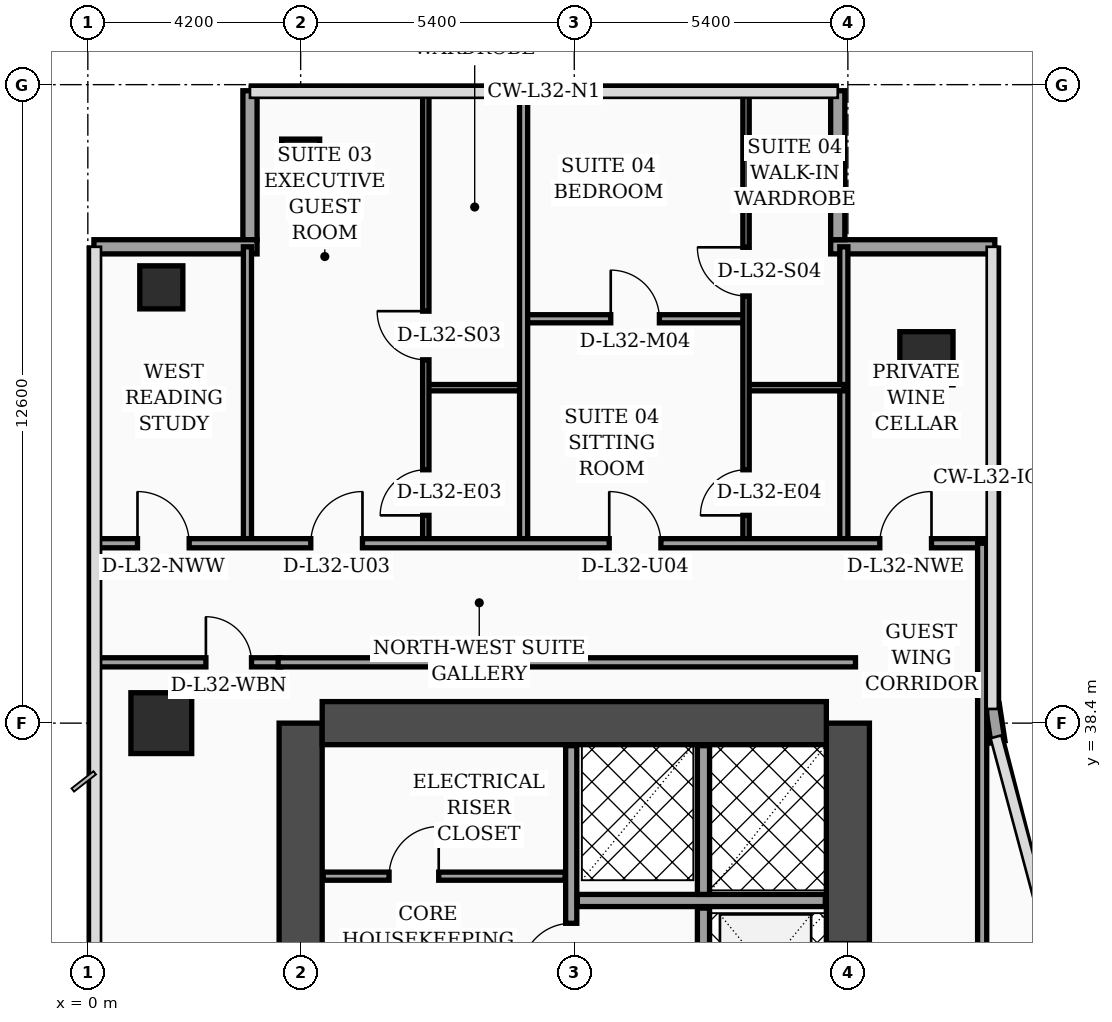
"""IFC4 building model, lengths in metres.
Left out: names, types, materials, properties, quantities, classifications, styles, units other than length and angle.
Written with IfcOpenShell. Run it as: python <this file> out.ifc"""

import sys

from ifc_helpers import new_model, si_unit, direction, frame, frame_2d, origin, origin_2d, place, context, subcontext, project, spatial, rectangle, hollow_rectangle, extrude, element, fill, save


model = new_model("IFC4")
c1 = context("Model", 3, precision=1e-05, world=origin(), true_north=direction((0.0, 1.0)))
c2 = subcontext(c1, "Body", "Model", "MODEL_VIEW")
j1 = project(units=[si_unit("LENGTHUNIT", "METRE"), si_unit("PLANEANGLEUNIT", "RADIAN")], contexts=[c1])
p1 = place(None, origin())
s1 = spatial("IfcSite", under=j1, at=p1, CompositionType="ELEMENT")
p2 = place(p1, origin())
s2 = spatial("IfcBuilding", under=s1, at=p2, CompositionType="ELEMENT")
p3 = place(p2, frame((0.0, 0.0, 131.6)))
s3 = spatial("IfcBuildingStorey", under=s2, at=p3, CompositionType="ELEMENT", Elevation=131.6)
p4 = place(p3, frame((4.2, 16.8, 0.0), z_axis=(0.0, 0.0, 1.0), x_axis=(0.0, 1.0, 0.0)))
e1 = element("IfcWall", 1, at=p4, inside=s3, PredefinedType="SHEAR", context=c2, shape_type="SweptSolid", body=[
    extrude(rectangle(XDim=21.6, YDim=0.85, at=frame_2d((10.8, 0.0))), origin(), (0.0, 0.0, 1.0), 3.56),
])
p5 = place(p3, frame((15.0, 16.8, 0.0), z_axis=(0.0, 0.0, 1.0), x_axis=(0.0, 1.0, 0.0)))
e2 = element("IfcWall", 2, at=p5, inside=s3, PredefinedType="SHEAR", context=c2, shape_type="SweptSolid", body=[
    extrude(rectangle(XDim=21.6, YDim=0.85, at=frame_2d((10.8, 0.0))), origin(), (0.0, 0.0, 1.0), 3.56),
])
p6 = place(p5, frame((8.65, 0.0, 0.0)))
e3 = element("IfcOpeningElement", 3, at=p6, cuts=e2, PredefinedType="OPENING", context=c2, shape_type="SweptSolid", body=[
    extrude(rectangle(XDim=1.1, YDim=2.2, at=frame_2d((0.55, 1.1))), frame((0.0, 0.435, 0.0), z_axis=(0.0, -1.0, 0.0), x_axis=(1.0, 0.0, 0.0)), (0.0, 0.0, 1.0), 0.87),
])
p7 = place(p5, frame((10.85, 0.0, 0.0)))
e4 = element("IfcOpeningElement", 4, at=p7, cuts=e2, PredefinedType="OPENING", context=c2, shape_type="SweptSolid", body=[
    extrude(rectangle(XDim=1.1, YDim=2.2, at=frame_2d((0.55, 1.1))), frame((0.0, 0.435, 0.0), z_axis=(0.0, -1.0, 0.0), x_axis=(1.0, 0.0, 0.0)), (0.0, 0.0, 1.0), 0.87),
])
p8 = place(p5, frame((13.5, 0.0, 0.0)))
e5 = element("IfcOpeningElement", 5, at=p8, cuts=e2, PredefinedType="OPENING", context=c2, shape_type="SweptSolid", body=[
    extrude(rectangle(XDim=1.1, YDim=2.2, at=frame_2d((0.55, 1.1))), frame((0.0, 0.435, 0.0), z_axis=(0.0, -1.0, 0.0), x_axis=(1.0, 0.0, 0.0)), (0.0, 0.0, 1.0), 0.87),
])
p9 = place(p5, frame((16.15, 0.0, 0.0)))
e6 = element("IfcOpeningElement", 6, at=p9, cuts=e2, PredefinedType="OPENING", context=c2, shape_type="SweptSolid", body=[
    extrude(rectangle(XDim=1.1, YDim=2.2, at=frame_2d((0.55, 1.1))), frame((0.0, 0.435, 0.0), z_axis=(0.0, -1.0, 0.0), x_axis=(1.0, 0.0, 0.0)), (0.0, 0.0, 1.0), 0.87),
])
p10 = place(p3, frame((4.625, 38.4, 0.0), z_axis=(0.0, 0.0, 1.0), x_axis=(1.0, 0.0, 0.0)))
e7 = element("IfcWall", 7, at=p10, inside=s3, PredefinedType="SHEAR", context=c2, shape_type="SweptSolid", body=[
    extrude(rectangle(XDim=9.95, YDim=0.85, at=frame_2d((4.975, 0.0))), origin(), (0.0, 0.0, 1.0), 3.56),
])
p11 = place(p3, frame((1.45, 38.4, 0.0), z_axis=(0.0, 0.0, 1.0), x_axis=(1.0, 0.0, 0.0)))
e8 = element("IfcColumn", 8, at=p11, inside=s3, PredefinedType="COLUMN", context=c2, shape_type="SweptSolid", body=[
    extrude(rectangle(XDim=1.2, YDim=1.2, at=origin_2d()), origin(), (0.0, 0.0, 1.0), 3.56),
])
p12 = place(p3, frame((1.45, 47.0, 0.0), z_axis=(0.0, 0.0, 1.0), x_axis=(1.0, 0.0, 0.0)))
e9 = element("IfcColumn", 9, at=p12, inside=s3, PredefinedType="COLUMN", context=c2, shape_type="SweptSolid", body=[
    extrude(hollow_rectangle(XDim=0.85, YDim=0.85, WallThickness=0.036, at=origin_2d()), origin(), (0.0, 0.0, 1.0), 3.56),
])
p13 = place(p3, frame((4.2, 49.55, 0.0), z_axis=(0.0, 0.0, 1.0), x_axis=(1.0, 0.0, 0.0)))
e10 = element("IfcColumn", 10, at=p13, inside=s3, PredefinedType="COLUMN", context=c2, shape_type="SweptSolid", body=[
    extrude(hollow_rectangle(XDim=0.75, YDim=0.75, WallThickness=0.032, at=origin_2d()), origin(), (0.0, 0.0, 1.0), 3.56),
])
p14 = place(p3, frame((16.55, 45.6, 0.0), z_axis=(0.0, 0.0, 1.0), x_axis=(1.0, 0.0, 0.0)))
e11 = element("IfcColumn", 11, at=p14, inside=s3, PredefinedType="COLUMN", context=c2, shape_type="SweptSolid", body=[
    extrude(rectangle(XDim=1.05, YDim=1.05, at=origin_2d()), origin(), (0.0, 0.0, 1.0), 3.56),
])
p15 = place(p3, frame((17.962, 38.03, 0.0), z_axis=(0.0, 0.0, 1.0), x_axis=(-0.15141125477, 0.988470855377, 0.0)))
e12 = element("IfcWall", 12, at=p15, inside=s3, PredefinedType="SOLIDWALL", context=c2, shape_type="SweptSolid", body=[
    extrude(rectangle(XDim=0.739, YDim=0.28, at=frame_2d((0.369, 0.0))), origin(), (0.0, 0.0, 1.0), 3.56),
])
p16 = place(p3, frame((17.9, 47.8, 0.0), z_axis=(0.0, 0.0, 1.0), x_axis=(-1.0, 0.0, 0.0)))
e13 = element("IfcWall", 13, at=p16, inside=s3, PredefinedType="SOLIDWALL", context=c2, shape_type="SweptSolid", body=[
    extrude(rectangle(XDim=3.24, YDim=0.28, at=frame_2d((1.62, 0.0))), origin(), (0.0, 0.0, 1.0), 3.56),
])
p17 = place(p3, frame((14.8, 47.94, 0.0), z_axis=(0.0, 0.0, 1.0), x_axis=(0.0, 1.0, 0.0)))
e14 = element("IfcWall", 14, at=p17, inside=s3, PredefinedType="SOLIDWALL", context=c2, shape_type="SweptSolid", body=[
    extrude(rectangle(XDim=2.94, YDim=0.28, at=frame_2d((1.47, 0.0))), origin(), (0.0, 0.0, 1.0), 3.56),
])
p18 = place(p3, frame((3.2, 50.88, 0.0), z_axis=(0.0, 0.0, 1.0), x_axis=(0.0, -1.0, 0.0)))
e15 = element("IfcWall", 15, at=p18, inside=s3, PredefinedType="SOLIDWALL", context=c2, shape_type="SweptSolid", body=[
    extrude(rectangle(XDim=2.94, YDim=0.28, at=frame_2d((1.47, 0.0))), origin(), (0.0, 0.0, 1.0), 3.04),
])
p19 = place(p3, frame((3.34, 47.8, 0.0), z_axis=(0.0, 0.0, 1.0), x_axis=(-1.0, 0.0, 0.0)))
e16 = element("IfcWall", 16, at=p19, inside=s3, PredefinedType="SOLIDWALL", context=c2, shape_type="SweptSolid", body=[
    extrude(rectangle(XDim=3.22, YDim=0.28, at=frame_2d((1.61, 0.0))), origin(), (0.0, 0.0, 1.0), 3.04),
])
p20 = place(p3, frame((4.645, 35.38, 0.0), z_axis=(0.0, 0.0, 1.0), x_axis=(1.0, 0.0, 0.0)))
e17 = element("IfcWall", 17, at=p20, inside=s3, PredefinedType="PARTITIONING", context=c2, shape_type="SweptSolid", body=[
    extrude(rectangle(XDim=4.775, YDim=0.16, at=frame_2d((2.387, 0.0))), origin(), (0.0, 0.0, 1.0), 3.56),
])
p21 = place(p20, frame((1.3, 0.0, 0.0)))
e18 = element("IfcOpeningElement", 18, at=p21, cuts=e17, PredefinedType="OPENING", context=c2, shape_type="SweptSolid", body=[
    extrude(rectangle(XDim=0.98, YDim=2.15, at=frame_2d((0.49, 1.075))), frame((0.0, 0.09, 0.0), z_axis=(0.0, -1.0, 0.0), x_axis=(1.0, 0.0, 0.0)), (0.0, 0.0, 1.0), 0.18),
])
p22 = place(p3, frame((9.54, 32.92, 0.0), z_axis=(0.0, 0.0, 1.0), x_axis=(0.0, 1.0, 0.0)))
e19 = element("IfcWall", 19, at=p22, inside=s3, PredefinedType="SOLIDWALL", context=c2, shape_type="SweptSolid", body=[
    extrude(rectangle(XDim=5.035, YDim=0.22, at=frame_2d((2.518, 0.0))), origin(), (0.0, 0.0, 1.0), 3.56),
])
p23 = place(p22, frame((0.55, 0.0, 0.0)))
e20 = element("IfcOpeningElement", 20, at=p23, cuts=e19, PredefinedType="OPENING", context=c2, shape_type="SweptSolid", body=[
    extrude(rectangle(XDim=0.98, YDim=2.15, at=frame_2d((0.49, 1.075))), frame((0.0, 0.12, 0.0), z_axis=(0.0, -1.0, 0.0), x_axis=(1.0, 0.0, 0.0)), (0.0, 0.0, 1.0), 0.24),
])
p24 = place(p3, frame((12.15, 27.0, 0.0), z_axis=(0.0, 0.0, 1.0), x_axis=(0.0, 1.0, 0.0)))
e21 = element("IfcWall", 21, at=p24, inside=s3, PredefinedType="SOLIDWALL", context=c2, shape_type="SweptSolid", body=[
    extrude(rectangle(XDim=7.75, YDim=0.24, at=frame_2d((3.875, 0.0))), origin(), (0.0, 0.0, 1.0), 3.56),
])
p25 = place(p3, frame((9.66, 34.9, 0.0), z_axis=(0.0, 0.0, 1.0), x_axis=(1.0, 0.0, 0.0)))
e22 = element("IfcWall", 22, at=p25, inside=s3, PredefinedType="SOLIDWALL", context=c2, shape_type="SweptSolid", body=[
    extrude(rectangle(XDim=4.895, YDim=0.24, at=frame_2d((2.448, 0.0))), origin(), (0.0, 0.0, 1.0), 3.56),
])
p26 = place(p3, frame((12.15, 35.02, 0.0), z_axis=(0.0, 0.0, 1.0), x_axis=(0.0, 1.0, 0.0)))
e23 = element("IfcWall", 23, at=p26, inside=s3, PredefinedType="SOLIDWALL", context=c2, shape_type="SweptSolid", body=[
    extrude(rectangle(XDim=2.935, YDim=0.24, at=frame_2d((1.468, 0.0))), origin(), (0.0, 0.0, 1.0), 3.56),
])
p27 = place(p3, frame((0.08, 39.6, 0.0), z_axis=(0.0, 0.0, 1.0), x_axis=(1.0, 0.0, 0.0)))
e24 = element("IfcWall", 24, at=p27, inside=s3, PredefinedType="PARTITIONING", context=c2, shape_type="SweptSolid", body=[
    extrude(rectangle(XDim=3.725, YDim=0.18, at=frame_2d((1.862, 0.0))), origin(), (0.0, 0.0, 1.0), 2.84),
])
p28 = place(p27, frame((2.25, 0.0, 0.0)))
e25 = element("IfcOpeningElement", 25, at=p28, cuts=e24, PredefinedType="OPENING", context=c2, shape_type="SweptSolid", body=[
    extrude(rectangle(XDim=0.9, YDim=2.15, at=frame_2d((0.45, 1.075))), frame((0.0, 0.1, 0.0), z_axis=(0.0, -1.0, 0.0), x_axis=(1.0, 0.0, 0.0)), (0.0, 0.0, 1.0), 0.2),
])
p29 = place(p3, frame((3.15, 41.95, 0.0), z_axis=(0.0, 0.0, 1.0), x_axis=(0.0, 1.0, 0.0)))
e26 = element("IfcWall", 26, at=p29, inside=s3, PredefinedType="PARTITIONING", context=c2, shape_type="SweptSolid", body=[
    extrude(rectangle(XDim=5.85, YDim=0.16, at=frame_2d((2.925, 0.0))), origin(), (0.0, 0.0, 1.0), 3.14),
])
p30 = place(p3, frame((14.92, 41.95, 0.0), z_axis=(0.0, 0.0, 1.0), x_axis=(0.0, 1.0, 0.0)))
e27 = element("IfcWall", 27, at=p30, inside=s3, PredefinedType="PARTITIONING", context=c2, shape_type="SweptSolid", body=[
    extrude(rectangle(XDim=5.85, YDim=0.16, at=frame_2d((2.925, 0.0))), origin(), (0.0, 0.0, 1.0), 3.04),
])
p31 = place(p3, frame((6.67, 45.02, 0.0), z_axis=(0.0, 0.0, 1.0), x_axis=(1.0, 0.0, 0.0)))
e28 = element("IfcWall", 28, at=p31, inside=s3, PredefinedType="PARTITIONING", context=c2, shape_type="SweptSolid", body=[
    extrude(rectangle(XDim=1.93, YDim=0.125, at=frame_2d((0.965, 0.0))), origin(), (0.0, 0.0, 1.0), 3.56),
])
p32 = place(p3, frame((6.67, 41.95, 0.0), z_axis=(0.0, 0.0, 1.0), x_axis=(0.0, 1.0, 0.0)))
e29 = element("IfcWall", 29, at=p32, inside=s3, PredefinedType="PARTITIONING", context=c2, shape_type="SweptSolid", body=[
    extrude(rectangle(XDim=8.99, YDim=0.125, at=frame_2d((4.495, 0.0))), origin(), (0.0, 0.0, 1.0), 3.04),
])
p33 = place(p32, frame((0.55, 0.0, 0.0)))
e30 = element("IfcOpeningElement", 30, at=p33, cuts=e29, PredefinedType="OPENING", context=c2, shape_type="SweptSolid", body=[
    extrude(rectangle(XDim=0.9, YDim=2.15, at=frame_2d((0.45, 1.075))), frame((0.0, 0.073, 0.0), z_axis=(0.0, -1.0, 0.0), x_axis=(1.0, 0.0, 0.0)), (0.0, 0.0, 1.0), 0.145),
])
p34 = place(p32, frame((3.62, 0.0, 0.0)))
e31 = element("IfcOpeningElement", 31, at=p34, cuts=e29, PredefinedType="OPENING", context=c2, shape_type="SweptSolid", body=[
    extrude(rectangle(XDim=0.96, YDim=2.2, at=frame_2d((0.48, 1.1))), frame((0.0, 0.073, 0.0), z_axis=(0.0, -1.0, 0.0), x_axis=(1.0, 0.0, 0.0)), (0.0, 0.0, 1.0), 0.145),
])
p35 = place(p3, frame((12.99, 45.02, 0.0), z_axis=(0.0, 0.0, 1.0), x_axis=(1.0, 0.0, 0.0)))
e32 = element("IfcWall", 32, at=p35, inside=s3, PredefinedType="PARTITIONING", context=c2, shape_type="SweptSolid", body=[
    extrude(rectangle(XDim=1.93, YDim=0.125, at=frame_2d((0.965, 0.0))), origin(), (0.0, 0.0, 1.0), 3.56),
])
p36 = place(p3, frame((8.6, 46.38, 0.0), z_axis=(0.0, 0.0, 1.0), x_axis=(1.0, 0.0, 0.0)))
e33 = element("IfcWall", 33, at=p36, inside=s3, PredefinedType="PARTITIONING", context=c2, shape_type="SweptSolid", body=[
    extrude(rectangle(XDim=4.39, YDim=0.16, at=frame_2d((2.195, 0.0))), origin(), (0.0, 0.0, 1.0), 3.04),
])
p37 = place(p36, frame((1.72, 0.0, 0.0)))
e34 = element("IfcOpeningElement", 34, at=p37, cuts=e33, PredefinedType="OPENING", context=c2, shape_type="SweptSolid", body=[
    extrude(rectangle(XDim=0.96, YDim=2.2, at=frame_2d((0.48, 1.1))), frame((0.0, 0.09, 0.0), z_axis=(0.0, -1.0, 0.0), x_axis=(1.0, 0.0, 0.0)), (0.0, 0.0, 1.0), 0.18),
])
p38 = place(p3, frame((12.99, 41.95, 0.0), z_axis=(0.0, 0.0, 1.0), x_axis=(0.0, 1.0, 0.0)))
e35 = element("IfcWall", 35, at=p38, inside=s3, PredefinedType="PARTITIONING", context=c2, shape_type="SweptSolid", body=[
    extrude(rectangle(XDim=8.99, YDim=0.125, at=frame_2d((4.495, 0.0))), origin(), (0.0, 0.0, 1.0), 3.04),
])
p39 = place(p38, frame((0.55, 0.0, 0.0)))
e36 = element("IfcOpeningElement", 36, at=p39, cuts=e35, PredefinedType="OPENING", context=c2, shape_type="SweptSolid", body=[
    extrude(rectangle(XDim=0.9, YDim=2.15, at=frame_2d((0.45, 1.075))), frame((0.0, 0.073, 0.0), z_axis=(0.0, -1.0, 0.0), x_axis=(1.0, 0.0, 0.0)), (0.0, 0.0, 1.0), 0.145),
])
p40 = place(p38, frame((4.88, 0.0, 0.0)))
e37 = element("IfcOpeningElement", 37, at=p40, cuts=e35, PredefinedType="OPENING", context=c2, shape_type="SweptSolid", body=[
    extrude(rectangle(XDim=0.96, YDim=2.2, at=frame_2d((0.48, 1.1))), frame((0.0, 0.073, 0.0), z_axis=(0.0, -1.0, 0.0), x_axis=(1.0, 0.0, 0.0)), (0.0, 0.0, 1.0), 0.145),
])
p41 = place(p3, frame((8.6, 41.95, 0.0), z_axis=(0.0, 0.0, 1.0), x_axis=(0.0, 1.0, 0.0)))
e38 = element("IfcWall", 38, at=p41, inside=s3, PredefinedType="PARTITIONING", context=c2, shape_type="SweptSolid", body=[
    extrude(rectangle(XDim=8.99, YDim=0.16, at=frame_2d((4.495, 0.0))), origin(), (0.0, 0.0, 1.0), 3.04),
])
p42 = place(p3, frame((0.08, 41.95, 0.0), z_axis=(0.0, 0.0, 1.0), x_axis=(1.0, 0.0, 0.0)))
e39 = element("IfcWall", 39, at=p42, inside=s3, PredefinedType="PARTITIONING", context=c2, shape_type="SweptSolid", body=[
    extrude(rectangle(XDim=17.77, YDim=0.18, at=frame_2d((8.885, 0.0))), origin(), (0.0, 0.0, 1.0), 2.84),
])
p43 = place(p42, frame((0.9, 0.0, 0.0)))
e40 = element("IfcOpeningElement", 40, at=p43, cuts=e39, PredefinedType="OPENING", context=c2, shape_type="SweptSolid", body=[
    extrude(rectangle(XDim=1.02, YDim=2.2, at=frame_2d((0.51, 1.1))), frame((0.0, 0.1, 0.0), z_axis=(0.0, -1.0, 0.0), x_axis=(1.0, 0.0, 0.0)), (0.0, 0.0, 1.0), 0.2),
])
p44 = place(p42, frame((4.32, 0.0, 0.0)))
e41 = element("IfcOpeningElement", 41, at=p44, cuts=e39, PredefinedType="OPENING", context=c2, shape_type="SweptSolid", body=[
    extrude(rectangle(XDim=1.02, YDim=2.2, at=frame_2d((0.51, 1.1))), frame((0.0, 0.1, 0.0), z_axis=(0.0, -1.0, 0.0), x_axis=(1.0, 0.0, 0.0)), (0.0, 0.0, 1.0), 0.2),
])
p45 = place(p42, frame((10.21, 0.0, 0.0)))
e42 = element("IfcOpeningElement", 42, at=p45, cuts=e39, PredefinedType="OPENING", context=c2, shape_type="SweptSolid", body=[
    extrude(rectangle(XDim=1.02, YDim=2.2, at=frame_2d((0.51, 1.1))), frame((0.0, 0.1, 0.0), z_axis=(0.0, -1.0, 0.0), x_axis=(1.0, 0.0, 0.0)), (0.0, 0.0, 1.0), 0.2),
])
p46 = place(p42, frame((15.55, 0.0, 0.0)))
e43 = element("IfcOpeningElement", 43, at=p46, cuts=e39, PredefinedType="OPENING", context=c2, shape_type="SweptSolid", body=[
    extrude(rectangle(XDim=1.02, YDim=2.2, at=frame_2d((0.51, 1.1))), frame((0.0, 0.1, 0.0), z_axis=(0.0, -1.0, 0.0), x_axis=(1.0, 0.0, 0.0)), (0.0, 0.0, 1.0), 0.2),
])
p47 = place(p3, frame((17.65, 24.3, 0.0), z_axis=(0.0, 0.0, 1.0), x_axis=(0.0, 1.0, 0.0)))
e44 = element("IfcWall", 44, at=p47, inside=s3, PredefinedType="PARTITIONING", context=c2, shape_type="SweptSolid", body=[
    extrude(rectangle(XDim=17.65, YDim=0.18, at=frame_2d((8.825, 0.0))), origin(), (0.0, 0.0, 1.0), 2.84),
])
p48 = place(p3, frame((3.755, 39.6, 0.0), z_axis=(0.0, 0.0, 1.0), x_axis=(1.0, 0.0, 0.0)))
e45 = element("IfcWall", 45, at=p48, inside=s3, PredefinedType="PARTITIONING", context=c2, shape_type="SweptSolid", body=[
    extrude(rectangle(XDim=11.395, YDim=0.18, at=frame_2d((5.698, 0.0))), origin(), (0.0, 0.0, 1.0), 2.84),
])
p49 = place(p21, origin())
e46 = element("IfcDoor", 46, at=p49, inside=s3, OperationType="SINGLE_SWING_RIGHT", PredefinedType="DOOR", context=c2, shape_type="SweptSolid", body=[
    extrude(rectangle(XDim=0.98, YDim=2.15, at=frame_2d((0.49, 1.075))), frame((0.0, 0.025, 0.0), z_axis=(0.0, -1.0, 0.0), x_axis=(1.0, 0.0, 0.0)), (0.0, 0.0, 1.0), 0.05),
])
fill(e18, e46)
p50 = place(p23, origin())
e47 = element("IfcDoor", 47, at=p50, inside=s3, OperationType="SINGLE_SWING_LEFT", PredefinedType="DOOR", context=c2, shape_type="SweptSolid", body=[
    extrude(rectangle(XDim=0.98, YDim=2.15, at=frame_2d((0.49, 1.075))), frame((0.0, 0.025, 0.0), z_axis=(0.0, -1.0, 0.0), x_axis=(1.0, 0.0, 0.0)), (0.0, 0.0, 1.0), 0.05),
])
fill(e20, e47)
p51 = place(p28, origin())
e48 = element("IfcDoor", 48, at=p51, inside=s3, OperationType="SINGLE_SWING_LEFT", PredefinedType="DOOR", context=c2, shape_type="SweptSolid", body=[
    extrude(rectangle(XDim=0.9, YDim=2.15, at=frame_2d((0.45, 1.075))), frame((0.0, 0.025, 0.0), z_axis=(0.0, -1.0, 0.0), x_axis=(1.0, 0.0, 0.0)), (0.0, 0.0, 1.0), 0.05),
])
fill(e25, e48)
p52 = place(p33, origin())
e49 = element("IfcDoor", 49, at=p52, inside=s3, OperationType="SINGLE_SWING_LEFT", PredefinedType="DOOR", context=c2, shape_type="SweptSolid", body=[
    extrude(rectangle(XDim=0.9, YDim=2.15, at=frame_2d((0.45, 1.075))), frame((0.0, 0.025, 0.0), z_axis=(0.0, -1.0, 0.0), x_axis=(1.0, 0.0, 0.0)), (0.0, 0.0, 1.0), 0.05),
])
fill(e30, e49)
p53 = place(p34, origin())
e50 = element("IfcDoor", 50, at=p53, inside=s3, OperationType="SINGLE_SWING_RIGHT", PredefinedType="DOOR", context=c2, shape_type="SweptSolid", body=[
    extrude(rectangle(XDim=0.96, YDim=2.2, at=frame_2d((0.48, 1.1))), frame((0.0, 0.025, 0.0), z_axis=(0.0, -1.0, 0.0), x_axis=(1.0, 0.0, 0.0)), (0.0, 0.0, 1.0), 0.05),
])
fill(e31, e50)
p54 = place(p37, origin())
e51 = element("IfcDoor", 51, at=p54, inside=s3, OperationType="SINGLE_SWING_LEFT", PredefinedType="DOOR", context=c2, shape_type="SweptSolid", body=[
    extrude(rectangle(XDim=0.96, YDim=2.2, at=frame_2d((0.48, 1.1))), frame((0.0, 0.025, 0.0), z_axis=(0.0, -1.0, 0.0), x_axis=(1.0, 0.0, 0.0)), (0.0, 0.0, 1.0), 0.05),
])
fill(e34, e51)
p55 = place(p39, origin())
e52 = element("IfcDoor", 52, at=p55, inside=s3, OperationType="SINGLE_SWING_LEFT", PredefinedType="DOOR", context=c2, shape_type="SweptSolid", body=[
    extrude(rectangle(XDim=0.9, YDim=2.15, at=frame_2d((0.45, 1.075))), frame((0.0, 0.025, 0.0), z_axis=(0.0, -1.0, 0.0), x_axis=(1.0, 0.0, 0.0)), (0.0, 0.0, 1.0), 0.05),
])
fill(e36, e52)
p56 = place(p40, origin())
e53 = element("IfcDoor", 53, at=p56, inside=s3, OperationType="SINGLE_SWING_RIGHT", PredefinedType="DOOR", context=c2, shape_type="SweptSolid", body=[
    extrude(rectangle(XDim=0.96, YDim=2.2, at=frame_2d((0.48, 1.1))), frame((0.0, 0.025, 0.0), z_axis=(0.0, -1.0, 0.0), x_axis=(1.0, 0.0, 0.0)), (0.0, 0.0, 1.0), 0.05),
])
fill(e37, e53)
p57 = place(p43, origin())
e54 = element("IfcDoor", 54, at=p57, inside=s3, OperationType="SINGLE_SWING_LEFT", PredefinedType="DOOR", context=c2, shape_type="SweptSolid", body=[
    extrude(rectangle(XDim=1.02, YDim=2.2, at=frame_2d((0.51, 1.1))), frame((0.0, 0.025, 0.0), z_axis=(0.0, -1.0, 0.0), x_axis=(1.0, 0.0, 0.0)), (0.0, 0.0, 1.0), 0.05),
])
fill(e40, e54)
p58 = place(p44, origin())
e55 = element("IfcDoor", 55, at=p58, inside=s3, OperationType="SINGLE_SWING_RIGHT", PredefinedType="DOOR", context=c2, shape_type="SweptSolid", body=[
    extrude(rectangle(XDim=1.02, YDim=2.2, at=frame_2d((0.51, 1.1))), frame((0.0, 0.025, 0.0), z_axis=(0.0, -1.0, 0.0), x_axis=(1.0, 0.0, 0.0)), (0.0, 0.0, 1.0), 0.05),
])
fill(e41, e55)
p59 = place(p45, origin())
e56 = element("IfcDoor", 56, at=p59, inside=s3, OperationType="SINGLE_SWING_LEFT", PredefinedType="DOOR", context=c2, shape_type="SweptSolid", body=[
    extrude(rectangle(XDim=1.02, YDim=2.2, at=frame_2d((0.51, 1.1))), frame((0.0, 0.025, 0.0), z_axis=(0.0, -1.0, 0.0), x_axis=(1.0, 0.0, 0.0)), (0.0, 0.0, 1.0), 0.05),
])
fill(e42, e56)
p60 = place(p46, origin())
e57 = element("IfcDoor", 57, at=p60, inside=s3, OperationType="SINGLE_SWING_RIGHT", PredefinedType="DOOR", context=c2, shape_type="SweptSolid", body=[
    extrude(rectangle(XDim=1.02, YDim=2.2, at=frame_2d((0.51, 1.1))), frame((0.0, 0.025, 0.0), z_axis=(0.0, -1.0, 0.0), x_axis=(1.0, 0.0, 0.0)), (0.0, 0.0, 1.0), 0.05),
])
fill(e43, e57)
save(model, sys.argv[1])
